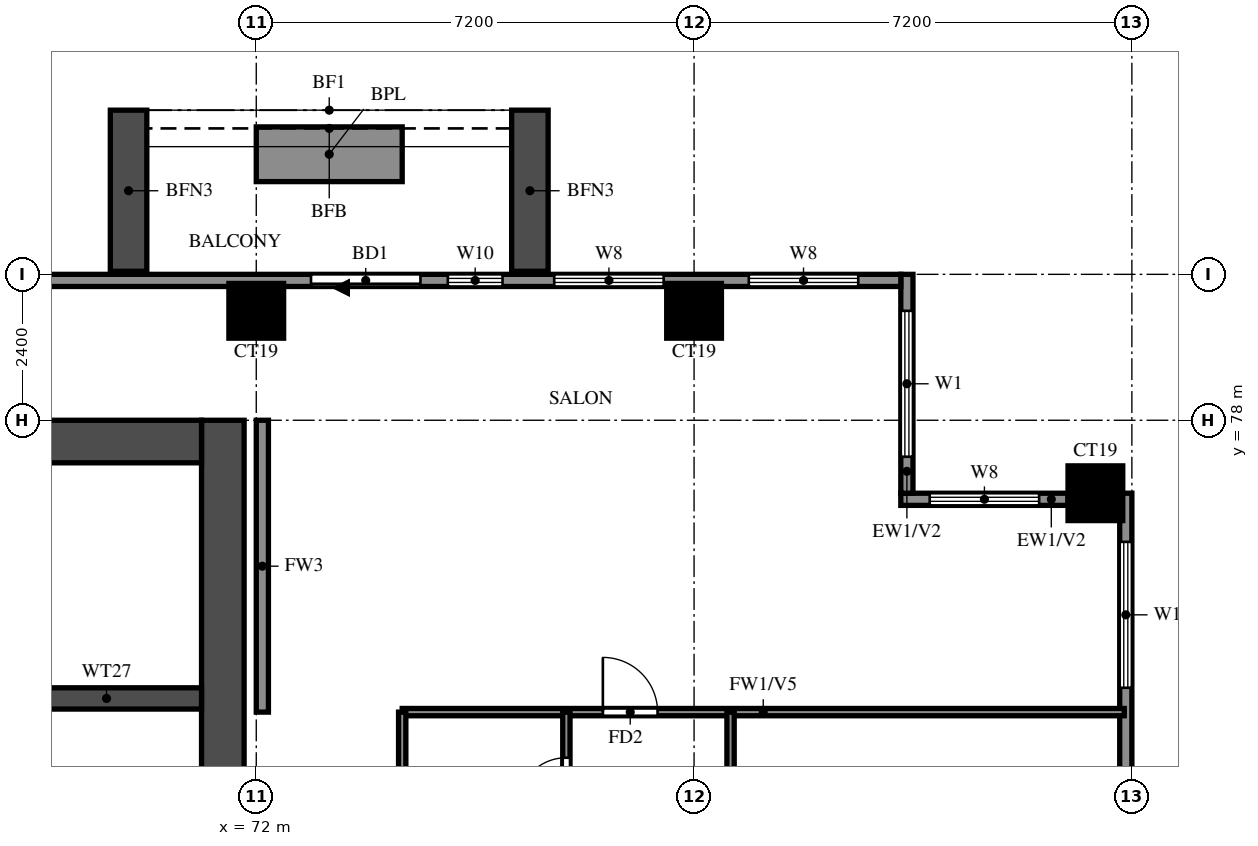
"""IFC4 building model, lengths in metres.
Left out: names, types, materials, properties, quantities, classifications, styles, units other than length and angle.
Written with IfcOpenShell. Run it as: python <this file> out.ifc"""

import sys

from ifc_helpers import new_model, si_unit, direction, frame, frame_2d, origin, origin_2d, place, context, subcontext, project, spatial, rectangle, extrude, source, transform, mapped, element, fill, save


model = new_model("IFC4")
c1 = context("Model", 3, precision=1e-05, world=origin(), true_north=direction((0.0, 1.0)))
c2 = subcontext(c1, "Body", "Model", "MODEL_VIEW")
j1 = project(units=[si_unit("LENGTHUNIT", "METRE"), si_unit("PLANEANGLEUNIT", "RADIAN")], contexts=[c1])
p1 = place(None, origin())
s1 = spatial("IfcSite", under=j1, at=p1, CompositionType="ELEMENT")
p2 = place(p1, origin())
s2 = spatial("IfcBuilding", under=s1, at=p2, CompositionType="ELEMENT")
p3 = place(p2, frame((0.0, 0.0, 113.0)))
s3 = spatial("IfcBuildingStorey", under=s2, at=p3, CompositionType="ELEMENT", Elevation=113.0)
m1 = source(origin(), c2, "Body", "SweptSolid", [
    extrude(rectangle(XDim=0.9, YDim=0.9, at=origin_2d()), origin(), (0.0, 0.0, 1.0), 3.2),
])
for number, where, z_axis, x_axis in (
    (1, (85.8, 76.8, 0.0), (0.0, 0.0, 1.0), (1.0, 0.0, 0.0)),
    (2, (72.0, 79.8, 0.0), (0.0, 0.0, 1.0), (1.0, 0.0, 0.0)),
    (3, (79.2, 79.8, 0.0), (0.0, 0.0, 1.0), (1.0, 0.0, 0.0)),
):
    element("IfcColumn", number, at=place(p3, frame(where, z_axis=z_axis, x_axis=x_axis)), inside=s3, PredefinedType="COLUMN", context=c2, shape_type="MappedRepresentation", body=[
        mapped(m1, transform((0.0, 0.0, 0.0))),
    ])
p4 = place(p3, frame((71.45, 66.1, 0.0), z_axis=(0.0, 0.0, 1.0), x_axis=(0.0, 1.0, 0.0)))
e4 = element("IfcWall", 4, at=p4, inside=s3, PredefinedType="SHEAR", context=c2, shape_type="SweptSolid", body=[
    extrude(rectangle(XDim=11.9, YDim=0.7, at=frame_2d((5.95, 0.0))), origin(), (0.0, 0.0, 1.0), 3.2),
])
p5 = place(p3, frame((29.7, 77.65, 0.0), z_axis=(0.0, 0.0, 1.0), x_axis=(1.0, 0.0, 0.0)))
e5 = element("IfcWall", 5, at=p5, inside=s3, PredefinedType="SHEAR", context=c2, shape_type="SweptSolid", body=[
    extrude(rectangle(XDim=41.4, YDim=0.7, at=frame_2d((20.7, 0.0))), origin(), (0.0, 0.0, 1.0), 3.2),
])
p6 = place(p3, frame((67.975, 73.425, 0.0), z_axis=(0.0, 0.0, 1.0), x_axis=(1.0, 0.0, 0.0)))
e6 = element("IfcWall", 6, at=p6, inside=s3, PredefinedType="SHEAR", context=c2, shape_type="SweptSolid", body=[
    extrude(rectangle(XDim=3.125, YDim=0.35, at=frame_2d((1.562, 0.0))), origin(), (0.0, 0.0, 1.0), 3.2),
])
p7 = place(p3, frame((86.3, 48.2, 0.0), z_axis=(0.0, 0.0, 1.0), x_axis=(0.0, 1.0, 0.0)))
e7 = element("IfcWall", 7, at=p7, inside=s3, PredefinedType="SOLIDWALL", context=c2, shape_type="SweptSolid", body=[
    extrude(rectangle(XDim=28.6, YDim=0.2, at=frame_2d((14.3, 0.0))), origin(), (0.0, 0.0, 1.0), 3.2),
])
p8 = place(p7, frame((0.6, 0.0, 0.6)))
e8 = element("IfcOpeningElement", 8, at=p8, cuts=e7, PredefinedType="OPENING", context=c2, shape_type="SweptSolid", body=[
    extrude(rectangle(XDim=2.4, YDim=2.4, at=frame_2d((1.2, 1.2))), frame((0.0, 0.11, 0.0), z_axis=(0.0, -1.0, 0.0), x_axis=(1.0, 0.0, 0.0)), (0.0, 0.0, 1.0), 0.22),
])
p9 = place(p7, frame((3.8, 0.0, 0.6)))
e9 = element("IfcOpeningElement", 9, at=p9, cuts=e7, PredefinedType="OPENING", context=c2, shape_type="SweptSolid", body=[
    extrude(rectangle(XDim=2.4, YDim=2.4, at=frame_2d((1.2, 1.2))), frame((0.0, 0.11, 0.0), z_axis=(0.0, -1.0, 0.0), x_axis=(1.0, 0.0, 0.0)), (0.0, 0.0, 1.0), 0.22),
])
p10 = place(p7, frame((7.8, 0.0, 0.6)))
e10 = element("IfcOpeningElement", 10, at=p10, cuts=e7, PredefinedType="OPENING", context=c2, shape_type="SweptSolid", body=[
    extrude(rectangle(XDim=2.4, YDim=2.4, at=frame_2d((1.2, 1.2))), frame((0.0, 0.11, 0.0), z_axis=(0.0, -1.0, 0.0), x_axis=(1.0, 0.0, 0.0)), (0.0, 0.0, 1.0), 0.22),
])
p11 = place(p7, frame((11.0, 0.0, 0.6)))
e11 = element("IfcOpeningElement", 11, at=p11, cuts=e7, PredefinedType="OPENING", context=c2, shape_type="SweptSolid", body=[
    extrude(rectangle(XDim=2.4, YDim=2.4, at=frame_2d((1.2, 1.2))), frame((0.0, 0.11, 0.0), z_axis=(0.0, -1.0, 0.0), x_axis=(1.0, 0.0, 0.0)), (0.0, 0.0, 1.0), 0.22),
])
p12 = place(p7, frame((15.167, 0.0, 0.6)))
e12 = element("IfcOpeningElement", 12, at=p12, cuts=e7, PredefinedType="OPENING", context=c2, shape_type="SweptSolid", body=[
    extrude(rectangle(XDim=2.4, YDim=2.4, at=frame_2d((1.2, 1.2))), frame((0.0, 0.11, 0.0), z_axis=(0.0, -1.0, 0.0), x_axis=(1.0, 0.0, 0.0)), (0.0, 0.0, 1.0), 0.22),
])
p13 = place(p7, frame((18.033, 0.0, 0.6)))
e13 = element("IfcOpeningElement", 13, at=p13, cuts=e7, PredefinedType="OPENING", context=c2, shape_type="SweptSolid", body=[
    extrude(rectangle(XDim=2.4, YDim=2.4, at=frame_2d((1.2, 1.2))), frame((0.0, 0.11, 0.0), z_axis=(0.0, -1.0, 0.0), x_axis=(1.0, 0.0, 0.0)), (0.0, 0.0, 1.0), 0.22),
])
p14 = place(p7, frame((22.95, 0.0, 1.5)))
e14 = element("IfcOpeningElement", 14, at=p14, cuts=e7, PredefinedType="OPENING", context=c2, shape_type="SweptSolid", body=[
    extrude(rectangle(XDim=0.9, YDim=0.9, at=frame_2d((0.45, 0.45))), frame((0.0, 0.11, 0.0), z_axis=(0.0, -1.0, 0.0), x_axis=(1.0, 0.0, 0.0)), (0.0, 0.0, 1.0), 0.22),
])
p15 = place(p7, frame((25.4, 0.0, 0.6)))
e15 = element("IfcOpeningElement", 15, at=p15, cuts=e7, PredefinedType="OPENING", context=c2, shape_type="SweptSolid", body=[
    extrude(rectangle(XDim=2.4, YDim=2.4, at=frame_2d((1.2, 1.2))), frame((0.0, 0.11, 0.0), z_axis=(0.0, -1.0, 0.0), x_axis=(1.0, 0.0, 0.0)), (0.0, 0.0, 1.0), 0.22),
])
p16 = place(p3, frame((85.35, 76.7, 0.0), z_axis=(0.0, 0.0, 1.0), x_axis=(-1.0, 0.0, 0.0)))
e16 = element("IfcWall", 16, at=p16, inside=s3, PredefinedType="SOLIDWALL", context=c2, shape_type="SweptSolid", body=[
    extrude(rectangle(XDim=2.75, YDim=0.2, at=frame_2d((1.375, 0.0))), origin(), (0.0, 0.0, 1.0), 3.2),
])
p17 = place(p16, frame((0.475, 0.0, 0.6)))
e17 = element("IfcOpeningElement", 17, at=p17, cuts=e16, PredefinedType="OPENING", context=c2, shape_type="SweptSolid", body=[
    extrude(rectangle(XDim=1.8, YDim=2.4, at=frame_2d((0.9, 1.2))), frame((0.0, 0.11, 0.0), z_axis=(0.0, -1.0, 0.0), x_axis=(1.0, 0.0, 0.0)), (0.0, 0.0, 1.0), 0.22),
])
p18 = place(p3, frame((82.7, 76.8, 0.0), z_axis=(0.0, 0.0, 1.0), x_axis=(0.0, 1.0, 0.0)))
e18 = element("IfcWall", 18, at=p18, inside=s3, PredefinedType="SOLIDWALL", context=c2, shape_type="SweptSolid", body=[
    extrude(rectangle(XDim=3.6, YDim=0.2, at=frame_2d((1.8, 0.0))), origin(), (0.0, 0.0, 1.0), 3.2),
])
p19 = place(p18, frame((0.6, 0.0, 0.6)))
e19 = element("IfcOpeningElement", 19, at=p19, cuts=e18, PredefinedType="OPENING", context=c2, shape_type="SweptSolid", body=[
    extrude(rectangle(XDim=2.4, YDim=2.4, at=frame_2d((1.2, 1.2))), frame((0.0, 0.11, 0.0), z_axis=(0.0, -1.0, 0.0), x_axis=(1.0, 0.0, 0.0)), (0.0, 0.0, 1.0), 0.22),
])
p20 = place(p3, frame((82.6, 80.3, 0.0), z_axis=(0.0, 0.0, 1.0), x_axis=(-1.0, 0.0, 0.0)))
e20 = element("IfcWall", 20, at=p20, inside=s3, PredefinedType="SOLIDWALL", context=c2, shape_type="SweptSolid", body=[
    extrude(rectangle(XDim=64.6, YDim=0.2, at=frame_2d((32.3, 0.0))), origin(), (0.0, 0.0, 1.0), 3.2),
])
p21 = place(p20, frame((7.9, 0.0, 0.0)))
e21 = element("IfcOpeningElement", 21, at=p21, cuts=e20, PredefinedType="OPENING", context=c2, shape_type="SweptSolid", body=[
    extrude(rectangle(XDim=1.8, YDim=2.4, at=frame_2d((0.9, 1.2))), frame((0.0, 0.11, 0.0), z_axis=(0.0, -1.0, 0.0), x_axis=(1.0, 0.0, 0.0)), (0.0, 0.0, 1.0), 0.22),
])
p22 = place(p20, frame((54.767, 0.0, 0.6)))
e22 = element("IfcOpeningElement", 22, at=p22, cuts=e20, PredefinedType="OPENING", context=c2, shape_type="SweptSolid", body=[
    extrude(rectangle(XDim=2.4, YDim=2.4, at=frame_2d((1.2, 1.2))), frame((0.0, 0.11, 0.0), z_axis=(0.0, -1.0, 0.0), x_axis=(1.0, 0.0, 0.0)), (0.0, 0.0, 1.0), 0.22),
])
p23 = place(p20, frame((57.633, 0.0, 0.6)))
e23 = element("IfcOpeningElement", 23, at=p23, cuts=e20, PredefinedType="OPENING", context=c2, shape_type="SweptSolid", body=[
    extrude(rectangle(XDim=2.4, YDim=2.4, at=frame_2d((1.2, 1.2))), frame((0.0, 0.11, 0.0), z_axis=(0.0, -1.0, 0.0), x_axis=(1.0, 0.0, 0.0)), (0.0, 0.0, 1.0), 0.22),
])
p24 = place(p20, frame((62.0, 0.0, 0.6)))
e24 = element("IfcOpeningElement", 24, at=p24, cuts=e20, PredefinedType="OPENING", context=c2, shape_type="SweptSolid", body=[
    extrude(rectangle(XDim=1.8, YDim=2.4, at=frame_2d((0.9, 1.2))), frame((0.0, 0.11, 0.0), z_axis=(0.0, -1.0, 0.0), x_axis=(1.0, 0.0, 0.0)), (0.0, 0.0, 1.0), 0.22),
])
p25 = place(p20, frame((0.7, 0.0, 0.6)))
e25 = element("IfcOpeningElement", 25, at=p25, cuts=e20, PredefinedType="OPENING", context=c2, shape_type="SweptSolid", body=[
    extrude(rectangle(XDim=1.8, YDim=2.4, at=frame_2d((0.9, 1.2))), frame((0.0, 0.11, 0.0), z_axis=(0.0, -1.0, 0.0), x_axis=(1.0, 0.0, 0.0)), (0.0, 0.0, 1.0), 0.22),
])
p26 = place(p20, frame((3.9, 0.0, 0.6)))
e26 = element("IfcOpeningElement", 26, at=p26, cuts=e20, PredefinedType="OPENING", context=c2, shape_type="SweptSolid", body=[
    extrude(rectangle(XDim=1.8, YDim=2.4, at=frame_2d((0.9, 1.2))), frame((0.0, 0.11, 0.0), z_axis=(0.0, -1.0, 0.0), x_axis=(1.0, 0.0, 0.0)), (0.0, 0.0, 1.0), 0.22),
])
p27 = place(p20, frame((6.55, 0.0, 0.6)))
e27 = element("IfcOpeningElement", 27, at=p27, cuts=e20, PredefinedType="OPENING", context=c2, shape_type="SweptSolid", body=[
    extrude(rectangle(XDim=0.9, YDim=2.4, at=frame_2d((0.45, 1.2))), frame((0.0, 0.11, 0.0), z_axis=(0.0, -1.0, 0.0), x_axis=(1.0, 0.0, 0.0)), (0.0, 0.0, 1.0), 0.22),
])
for number, where, z_axis, x_axis in (
    (28, (76.5, 80.45, 0.0), (0.0, 0.0, 1.0), (0.0, 1.0, 0.0)),
    (29, (69.9, 80.45, 0.0), (0.0, 0.0, 1.0), (0.0, 1.0, 0.0)),
):
    element("IfcWall", number, at=place(p3, frame(where, z_axis=z_axis, x_axis=x_axis)), inside=s3, PredefinedType="SOLIDWALL", context=c2, shape_type="SweptSolid", body=[
        extrude(rectangle(XDim=2.65, YDim=0.6, at=frame_2d((1.325, 0.0))), origin(), (0.0, 0.0, 1.0), 2.85),
    ])
p28 = place(p3, frame((74.4, 82.375, 0.0), z_axis=(0.0, 0.0, 1.0), x_axis=(-1.0, 0.0, 0.0)))
e30 = element("IfcWall", 30, at=p28, inside=s3, PredefinedType="SOLIDWALL", context=c2, shape_type="SweptSolid", body=[
    extrude(rectangle(XDim=2.4, YDim=0.9, at=frame_2d((1.2, 0.0))), origin(), (0.0, 0.0, 1.0), 0.9),
])
p29 = place(p3, frame((72.1, 73.2, 0.0), z_axis=(0.0, 0.0, 1.0), x_axis=(0.0, 1.0, 0.0)))
e31 = element("IfcWall", 31, at=p29, inside=s3, PredefinedType="SOLIDWALL", context=c2, shape_type="SweptSolid", body=[
    extrude(rectangle(XDim=4.8, YDim=0.2, at=frame_2d((2.4, 0.0))), origin(), (0.0, 0.0, 1.0), 3.2),
])
p30 = place(p3, frame((74.4, 73.2, 0.0), z_axis=(0.0, 0.0, 1.0), x_axis=(1.0, 0.0, 0.0)))
e32 = element("IfcWall", 32, at=p30, inside=s3, PredefinedType="PARTITIONING", context=c2, shape_type="SweptSolid", body=[
    extrude(rectangle(XDim=11.875, YDim=0.12, at=frame_2d((5.938, 0.0))), origin(), (0.0, 0.0, 1.0), 2.3),
])
p31 = place(p30, frame((3.3, 0.0, 0.0)))
e33 = element("IfcOpeningElement", 33, at=p31, cuts=e32, PredefinedType="OPENING", context=c2, shape_type="SweptSolid", body=[
    extrude(rectangle(XDim=0.9, YDim=2.1, at=frame_2d((0.45, 1.05))), frame((0.0, 0.07, 0.0), z_axis=(0.0, -1.0, 0.0), x_axis=(1.0, 0.0, 0.0)), (0.0, 0.0, 1.0), 0.14),
])
p32 = place(p3, frame((74.4, 70.9, 0.0), z_axis=(0.0, 0.0, 1.0), x_axis=(0.0, 1.0, 0.0)))
e34 = element("IfcWall", 34, at=p32, inside=s3, PredefinedType="PARTITIONING", context=c2, shape_type="SweptSolid", body=[
    extrude(rectangle(XDim=2.3, YDim=0.12, at=frame_2d((1.15, 0.0))), origin(), (0.0, 0.0, 1.0), 3.2),
])
p33 = place(p3, frame((77.1, 61.2, 0.0), z_axis=(0.0, 0.0, 1.0), x_axis=(0.0, 1.0, 0.0)))
e35 = element("IfcWall", 35, at=p33, inside=s3, PredefinedType="PARTITIONING", context=c2, shape_type="SweptSolid", body=[
    extrude(rectangle(XDim=12.0, YDim=0.12, at=frame_2d((6.0, 0.0))), origin(), (0.0, 0.0, 1.0), 3.2),
])
p34 = place(p33, frame((4.2, 0.0, 0.0)))
e36 = element("IfcOpeningElement", 36, at=p34, cuts=e35, PredefinedType="OPENING", context=c2, shape_type="SweptSolid", body=[
    extrude(rectangle(XDim=0.9, YDim=2.1, at=frame_2d((0.45, 1.05))), frame((0.0, 0.07, 0.0), z_axis=(0.0, -1.0, 0.0), x_axis=(1.0, 0.0, 0.0)), (0.0, 0.0, 1.0), 0.14),
])
p35 = place(p33, frame((7.975, 0.0, 0.0)))
e37 = element("IfcOpeningElement", 37, at=p35, cuts=e35, PredefinedType="OPENING", context=c2, shape_type="SweptSolid", body=[
    extrude(rectangle(XDim=0.8, YDim=2.1, at=frame_2d((0.4, 1.05))), frame((0.0, 0.07, 0.0), z_axis=(0.0, -1.0, 0.0), x_axis=(1.0, 0.0, 0.0)), (0.0, 0.0, 1.0), 0.14),
])
p36 = place(p33, frame((10.45, 0.0, 0.0)))
e38 = element("IfcOpeningElement", 38, at=p36, cuts=e35, PredefinedType="OPENING", context=c2, shape_type="SweptSolid", body=[
    extrude(rectangle(XDim=0.8, YDim=2.1, at=frame_2d((0.4, 1.05))), frame((0.0, 0.07, 0.0), z_axis=(0.0, -1.0, 0.0), x_axis=(1.0, 0.0, 0.0)), (0.0, 0.0, 1.0), 0.14),
])
p37 = place(p3, frame((79.8, 69.6, 0.0), z_axis=(0.0, 0.0, 1.0), x_axis=(0.0, 1.0, 0.0)))
e39 = element("IfcWall", 39, at=p37, inside=s3, PredefinedType="PARTITIONING", context=c2, shape_type="SweptSolid", body=[
    extrude(rectangle(XDim=3.6, YDim=0.12, at=frame_2d((1.8, 0.0))), origin(), (0.0, 0.0, 1.0), 3.2),
])
p38 = place(p15, origin())
e40 = element("IfcWindow", 40, at=p38, inside=s3, PartitioningType="DOUBLE_PANEL_VERTICAL", PredefinedType="WINDOW", context=c2, shape_type="SweptSolid", body=[
    extrude(rectangle(XDim=2.4, YDim=2.4, at=frame_2d((1.2, 1.2))), frame((0.0, 0.03, 0.0), z_axis=(0.0, -1.0, 0.0), x_axis=(1.0, 0.0, 0.0)), (0.0, 0.0, 1.0), 0.06),
])
fill(e15, e40)
p39 = place(p17, origin())
e41 = element("IfcWindow", 41, at=p39, inside=s3, PartitioningType="DOUBLE_PANEL_VERTICAL", PredefinedType="WINDOW", context=c2, shape_type="SweptSolid", body=[
    extrude(rectangle(XDim=1.8, YDim=2.4, at=frame_2d((0.9, 1.2))), frame((0.0, 0.03, 0.0), z_axis=(0.0, -1.0, 0.0), x_axis=(1.0, 0.0, 0.0)), (0.0, 0.0, 1.0), 0.06),
])
fill(e17, e41)
p40 = place(p19, origin())
e42 = element("IfcWindow", 42, at=p40, inside=s3, PartitioningType="DOUBLE_PANEL_VERTICAL", PredefinedType="WINDOW", context=c2, shape_type="SweptSolid", body=[
    extrude(rectangle(XDim=2.4, YDim=2.4, at=frame_2d((1.2, 1.2))), frame((0.0, 0.03, 0.0), z_axis=(0.0, -1.0, 0.0), x_axis=(1.0, 0.0, 0.0)), (0.0, 0.0, 1.0), 0.06),
])
fill(e19, e42)
p41 = place(p21, origin())
e43 = element("IfcDoor", 43, at=p41, inside=s3, OperationType="DOUBLE_DOOR_SLIDING", PredefinedType="DOOR", context=c2, shape_type="SweptSolid", body=[
    extrude(rectangle(XDim=1.8, YDim=2.4, at=frame_2d((0.9, 1.2))), frame((0.0, 0.025, 0.0), z_axis=(0.0, -1.0, 0.0), x_axis=(1.0, 0.0, 0.0)), (0.0, 0.0, 1.0), 0.05),
])
fill(e21, e43)
p42 = place(p25, origin())
e44 = element("IfcWindow", 44, at=p42, inside=s3, PartitioningType="DOUBLE_PANEL_VERTICAL", PredefinedType="WINDOW", context=c2, shape_type="SweptSolid", body=[
    extrude(rectangle(XDim=1.8, YDim=2.4, at=frame_2d((0.9, 1.2))), frame((0.0, 0.03, 0.0), z_axis=(0.0, -1.0, 0.0), x_axis=(1.0, 0.0, 0.0)), (0.0, 0.0, 1.0), 0.06),
])
fill(e25, e44)
p43 = place(p26, origin())
e45 = element("IfcWindow", 45, at=p43, inside=s3, PartitioningType="DOUBLE_PANEL_VERTICAL", PredefinedType="WINDOW", context=c2, shape_type="SweptSolid", body=[
    extrude(rectangle(XDim=1.8, YDim=2.4, at=frame_2d((0.9, 1.2))), frame((0.0, 0.03, 0.0), z_axis=(0.0, -1.0, 0.0), x_axis=(1.0, 0.0, 0.0)), (0.0, 0.0, 1.0), 0.06),
])
fill(e26, e45)
p44 = place(p27, origin())
e46 = element("IfcWindow", 46, at=p44, inside=s3, PartitioningType="SINGLE_PANEL", PredefinedType="WINDOW", context=c2, shape_type="SweptSolid", body=[
    extrude(rectangle(XDim=0.9, YDim=2.4, at=frame_2d((0.45, 1.2))), frame((0.0, 0.03, 0.0), z_axis=(0.0, -1.0, 0.0), x_axis=(1.0, 0.0, 0.0)), (0.0, 0.0, 1.0), 0.06),
])
fill(e27, e46)
p45 = place(p31, origin())
e47 = element("IfcDoor", 47, at=p45, inside=s3, OperationType="SINGLE_SWING_LEFT", PredefinedType="DOOR", context=c2, shape_type="SweptSolid", body=[
    extrude(rectangle(XDim=0.9, YDim=2.1, at=frame_2d((0.45, 1.05))), frame((0.0, 0.025, 0.0), z_axis=(0.0, -1.0, 0.0), x_axis=(1.0, 0.0, 0.0)), (0.0, 0.0, 1.0), 0.05),
])
fill(e33, e47)
p46 = place(p36, origin())
e48 = element("IfcDoor", 48, at=p46, inside=s3, OperationType="SINGLE_SWING_LEFT", PredefinedType="DOOR", context=c2, shape_type="SweptSolid", body=[
    extrude(rectangle(XDim=0.8, YDim=2.1, at=frame_2d((0.4, 1.05))), frame((0.0, 0.025, 0.0), z_axis=(0.0, -1.0, 0.0), x_axis=(1.0, 0.0, 0.0)), (0.0, 0.0, 1.0), 0.05),
])
fill(e38, e48)
save(model, sys.argv[1])
